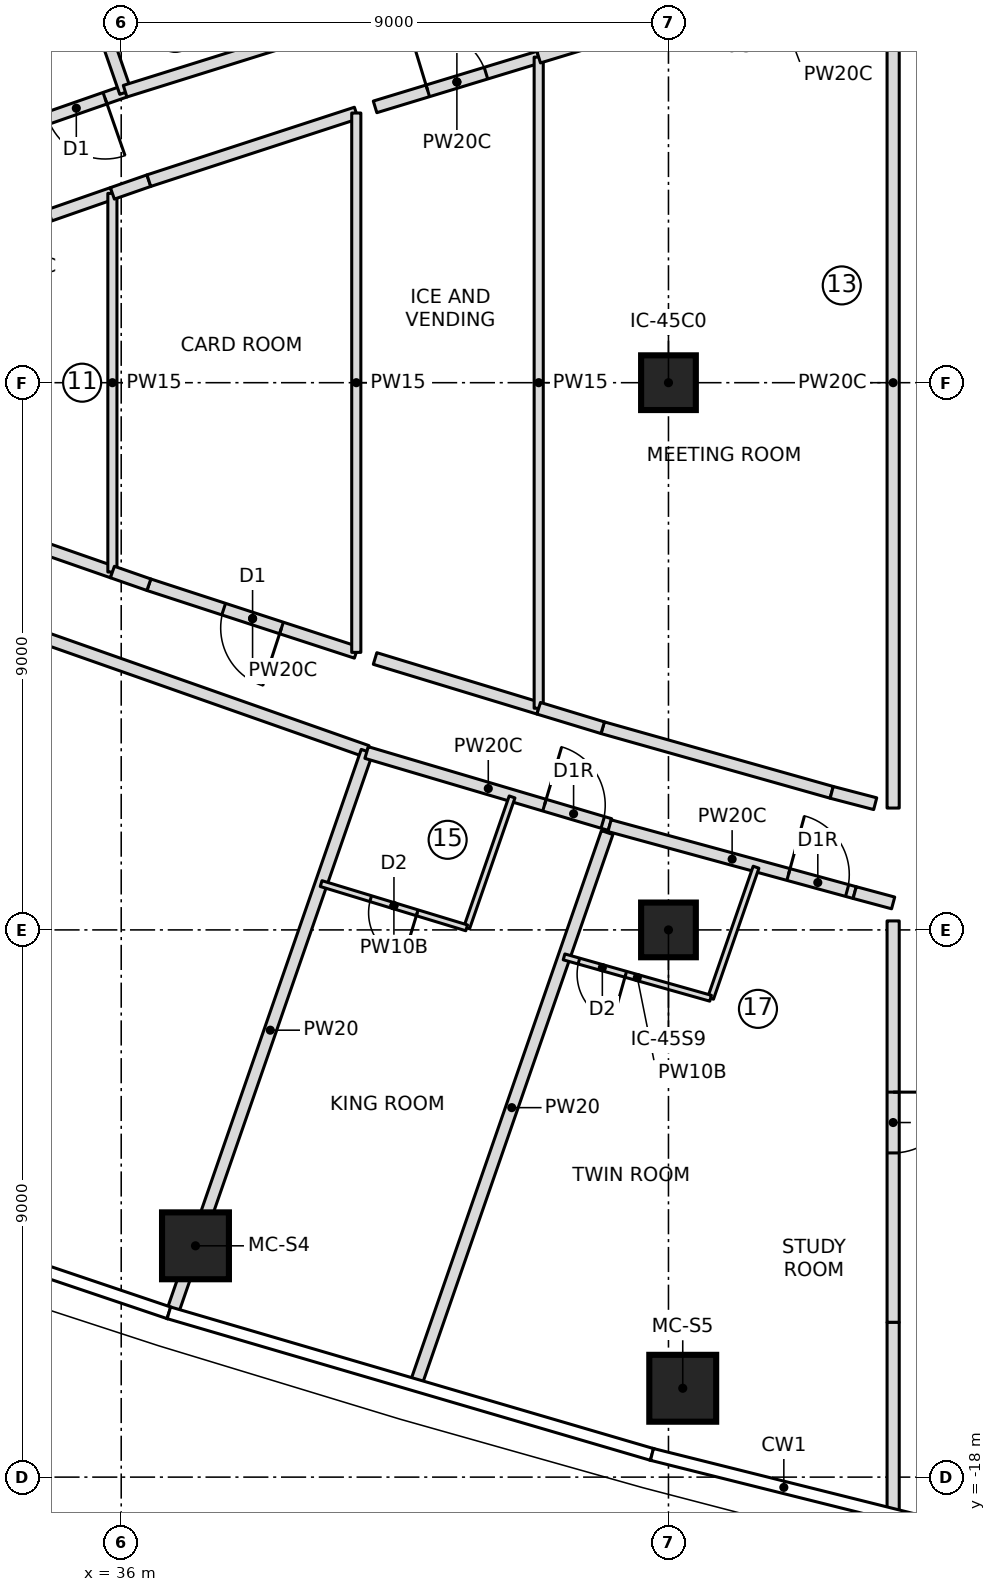
"""IFC4 building model, lengths in metres.
Left out: names, types, materials, properties, quantities, classifications, styles, units other than length and angle.
Written with IfcOpenShell. Run it as: python <this file> out.ifc"""

import sys

from ifc_helpers import new_model, si_unit, direction, frame, frame_2d, origin, origin_2d, place, context, subcontext, project, spatial, rectangle, extrude, element, fill, save


model = new_model("IFC4")
c1 = context("Model", 3, precision=1e-05, world=origin(), true_north=direction((0.0, 1.0)))
c2 = subcontext(c1, "Body", "Model", "MODEL_VIEW")
j1 = project(units=[si_unit("LENGTHUNIT", "METRE"), si_unit("PLANEANGLEUNIT", "RADIAN")], contexts=[c1])
p1 = place(None, origin())
s1 = spatial("IfcSite", under=j1, at=p1, CompositionType="ELEMENT")
p2 = place(p1, origin())
s2 = spatial("IfcBuilding", under=s1, at=p2, CompositionType="ELEMENT")
p3 = place(p2, frame((0.0, 0.0, 296.3)))
s3 = spatial("IfcBuildingStorey", under=s2, at=p3, CompositionType="ELEMENT", Elevation=296.3)
for number, where, z_axis, x_axis in (
    (1, (37.221, -14.196, 0.0), (0.0, 0.0, 1.0), (1.0, 0.0, 0.0)),
    (2, (45.235, -16.539, 0.0), (0.0, 0.0, 1.0), (1.0, 0.0, 0.0)),
):
    element("IfcColumn", number, at=place(p3, frame(where, z_axis=z_axis, x_axis=x_axis)), inside=s3, PredefinedType="COLUMN", context=c2, shape_type="SweptSolid", body=[
        extrude(rectangle(XDim=1.1, YDim=1.1, at=origin_2d()), origin(), (0.0, 0.0, 1.0), 3.55),
    ])
for number, where, z_axis, x_axis in (
    (3, (45.0, -9.0, 0.0), (0.0, 0.0, 1.0), (1.0, 0.0, 0.0)),
    (4, (45.0, 0.0, 0.0), (0.0, 0.0, 1.0), (1.0, 0.0, 0.0)),
):
    element("IfcColumn", number, at=place(p3, frame(where, z_axis=z_axis, x_axis=x_axis)), inside=s3, PredefinedType="COLUMN", context=c2, shape_type="SweptSolid", body=[
        extrude(rectangle(XDim=0.9, YDim=0.9, at=origin_2d()), origin(), (0.0, 0.0, 1.0), 3.55),
    ])
p4 = place(p3, frame((36.064, 4.794, 0.0), z_axis=(0.0, 0.0, 1.0), x_axis=(-0.944236129554, -0.329269086986, 0.0)))
e5 = element("IfcWall", 5, at=p4, inside=s3, PredefinedType="PARTITIONING", context=c2, shape_type="SweptSolid", body=[
    extrude(rectangle(XDim=4.174, YDim=0.2, at=frame_2d((2.087, 0.0))), origin(), (0.0, 0.0, 1.0), 3.25),
])
p5 = place(p4, frame((0.35, 0.0, 0.0)))
e6 = element("IfcOpeningElement", 6, at=p5, cuts=e5, PredefinedType="OPENING", context=c2, shape_type="SweptSolid", body=[
    extrude(rectangle(XDim=1.0, YDim=2.1, at=frame_2d((0.5, 1.05))), frame((0.0, 0.11, 0.0), z_axis=(0.0, -1.0, 0.0), x_axis=(1.0, 0.0, 0.0)), (0.0, 0.0, 1.0), 0.22),
])
p6 = place(p3, frame((36.071, 4.775, 0.0), z_axis=(0.0, 0.0, 1.0), x_axis=(-0.327725028322, 0.94477315045, 0.0)))
e7 = element("IfcWall", 7, at=p6, inside=s3, PredefinedType="PARTITIONING", context=c2, shape_type="SweptSolid", body=[
    extrude(rectangle(XDim=9.702, YDim=0.2, at=frame_2d((4.851, 0.0))), origin(), (0.0, 0.0, 1.0), 3.25),
])
p7 = place(p3, frame((44.031, 7.286, 0.0), z_axis=(0.0, 0.0, 1.0), x_axis=(-0.95441177989, -0.29849313963, 0.0)))
e8 = element("IfcWall", 8, at=p7, inside=s3, PredefinedType="PARTITIONING", context=c2, shape_type="SweptSolid", body=[
    extrude(rectangle(XDim=8.348, YDim=0.2, at=frame_2d((4.174, 0.0))), origin(), (0.0, 0.0, 1.0), 3.25),
])
p8 = place(p7, frame((0.35, 0.0, 0.0)))
e9 = element("IfcOpeningElement", 9, at=p8, cuts=e8, PredefinedType="OPENING", context=c2, shape_type="SweptSolid", body=[
    extrude(rectangle(XDim=1.5, YDim=2.1, at=frame_2d((0.75, 1.05))), frame((0.0, 0.11, 0.0), z_axis=(0.0, -1.0, 0.0), x_axis=(1.0, 0.0, 0.0)), (0.0, 0.0, 1.0), 0.22),
])
p9 = place(p3, frame((26.85, -1.423, 0.0), z_axis=(0.0, 0.0, 1.0), x_axis=(0.943328585164, -0.331860182022, 0.0)))
e10 = element("IfcWall", 10, at=p9, inside=s3, PredefinedType="PARTITIONING", context=c2, shape_type="SweptSolid", body=[
    extrude(rectangle(XDim=13.984, YDim=0.2, at=frame_2d((6.992, 0.0))), origin(), (0.0, 0.0, 1.0), 3.25),
])
p10 = place(p9, frame((3.05, 0.0, 0.0)))
e11 = element("IfcOpeningElement", 11, at=p10, cuts=e10, PredefinedType="OPENING", context=c2, shape_type="SweptSolid", body=[
    extrude(rectangle(XDim=1.5, YDim=2.1, at=frame_2d((0.75, 1.05))), frame((0.0, 0.11, 0.0), z_axis=(0.0, -1.0, 0.0), x_axis=(1.0, 0.0, 0.0)), (0.0, 0.0, 1.0), 0.22),
])
p11 = place(p3, frame((36.861, -15.235, 0.0), z_axis=(0.0, 0.0, 1.0), x_axis=(0.327710853631, 0.944778067279, 0.0)))
e12 = element("IfcWall", 12, at=p11, inside=s3, PredefinedType="PARTITIONING", context=c2, shape_type="SweptSolid", body=[
    extrude(rectangle(XDim=9.707, YDim=0.2, at=frame_2d((4.854, 0.0))), origin(), (0.0, 0.0, 1.0), 3.25),
])
p12 = place(p3, frame((40.035, -6.083, 0.0), z_axis=(0.0, 0.0, 1.0), x_axis=(0.958901312153, -0.283739799027, 0.0)))
e13 = element("IfcWall", 13, at=p12, inside=s3, PredefinedType="PARTITIONING", context=c2, shape_type="SweptSolid", body=[
    extrude(rectangle(XDim=4.174, YDim=0.2, at=frame_2d((2.087, 0.0))), origin(), (0.0, 0.0, 1.0), 3.25),
])
p13 = place(p12, frame((3.05, 0.0, 0.0)))
e14 = element("IfcOpeningElement", 14, at=p13, cuts=e13, PredefinedType="OPENING", context=c2, shape_type="SweptSolid", body=[
    extrude(rectangle(XDim=1.0, YDim=2.1, at=frame_2d((0.5, 1.05))), frame((0.0, 0.11, 0.0), z_axis=(0.0, -1.0, 0.0), x_axis=(1.0, 0.0, 0.0)), (0.0, 0.0, 1.0), 0.22),
])
p14 = place(p3, frame((42.428, -6.813, 0.0), z_axis=(0.0, 0.0, 1.0), x_axis=(-0.327743427431, -0.944766767925, 0.0)))
e15 = element("IfcWall", 15, at=p14, inside=s3, PredefinedType="PARTITIONING", context=c2, shape_type="SweptSolid", body=[
    extrude(rectangle(XDim=2.279, YDim=0.1, at=frame_2d((1.139, 0.0))), origin(), (0.0, 0.0, 1.0), 3.25),
])
p15 = place(p3, frame((41.681, -8.966, 0.0), z_axis=(0.0, 0.0, 1.0), x_axis=(-0.956723503196, 0.290998519638, 0.0)))
e16 = element("IfcWall", 16, at=p15, inside=s3, PredefinedType="PARTITIONING", context=c2, shape_type="SweptSolid", body=[
    extrude(rectangle(XDim=2.502, YDim=0.1, at=frame_2d((1.251, 0.0))), origin(), (0.0, 0.0, 1.0), 3.25),
])
p16 = place(p15, frame((0.85, 0.0, 0.0)))
e17 = element("IfcOpeningElement", 17, at=p16, cuts=e16, PredefinedType="OPENING", context=c2, shape_type="SweptSolid", body=[
    extrude(rectangle(XDim=0.8, YDim=2.1, at=frame_2d((0.4, 1.05))), frame((0.0, 0.06, 0.0), z_axis=(0.0, -1.0, 0.0), x_axis=(1.0, 0.0, 0.0)), (0.0, 0.0, 1.0), 0.12),
])
p17 = place(p3, frame((40.854, -16.447, 0.0), z_axis=(0.0, 0.0, 1.0), x_axis=(0.327714654767, 0.944776748788, 0.0)))
e18 = element("IfcWall", 18, at=p17, inside=s3, PredefinedType="PARTITIONING", context=c2, shape_type="SweptSolid", body=[
    extrude(rectangle(XDim=9.577, YDim=0.2, at=frame_2d((4.788, 0.0))), origin(), (0.0, 0.0, 1.0), 3.25),
])
p18 = place(p3, frame((44.031, -7.286, 0.0), z_axis=(0.0, 0.0, 1.0), x_axis=(0.964708521199, -0.263320088726, 0.0)))
e19 = element("IfcWall", 19, at=p18, inside=s3, PredefinedType="PARTITIONING", context=c2, shape_type="SweptSolid", body=[
    extrude(rectangle(XDim=4.179, YDim=0.2, at=frame_2d((2.089, 0.0))), origin(), (0.0, 0.0, 1.0), 3.25),
])
p19 = place(p18, frame((3.05, 0.0, 0.0)))
e20 = element("IfcOpeningElement", 20, at=p19, cuts=e19, PredefinedType="OPENING", context=c2, shape_type="SweptSolid", body=[
    extrude(rectangle(XDim=1.0, YDim=2.1, at=frame_2d((0.5, 1.05))), frame((0.0, 0.11, 0.0), z_axis=(0.0, -1.0, 0.0), x_axis=(1.0, 0.0, 0.0)), (0.0, 0.0, 1.0), 0.22),
])
p20 = place(p3, frame((46.44, -7.969, 0.0), z_axis=(0.0, 0.0, 1.0), x_axis=(-0.327764902685, -0.944759317799, 0.0)))
e21 = element("IfcWall", 21, at=p20, inside=s3, PredefinedType="PARTITIONING", context=c2, shape_type="SweptSolid", body=[
    extrude(rectangle(XDim=2.281, YDim=0.1, at=frame_2d((1.14, 0.0))), origin(), (0.0, 0.0, 1.0), 3.25),
])
p21 = place(p3, frame((45.693, -10.124, 0.0), z_axis=(0.0, 0.0, 1.0), x_axis=(-0.962409173596, 0.271603723424, 0.0)))
e22 = element("IfcWall", 22, at=p21, inside=s3, PredefinedType="PARTITIONING", context=c2, shape_type="SweptSolid", body=[
    extrude(rectangle(XDim=2.504, YDim=0.1, at=frame_2d((1.252, 0.0))), origin(), (0.0, 0.0, 1.0), 3.25),
])
p22 = place(p21, frame((1.45, 0.0, 0.0)))
e23 = element("IfcOpeningElement", 23, at=p22, cuts=e22, PredefinedType="OPENING", context=c2, shape_type="SweptSolid", body=[
    extrude(rectangle(XDim=0.8, YDim=2.1, at=frame_2d((0.4, 1.05))), frame((0.0, 0.06, 0.0), z_axis=(0.0, -1.0, 0.0), x_axis=(1.0, 0.0, 0.0)), (0.0, 0.0, 1.0), 0.12),
])
p23 = place(p3, frame((32.855, 2.068, 0.0), z_axis=(0.0, 0.0, 1.0), x_axis=(0.944260188635, 0.329200085296, 0.0)))
e24 = element("IfcWall", 24, at=p23, inside=s3, PredefinedType="PARTITIONING", context=c2, shape_type="SweptSolid", body=[
    extrude(rectangle(XDim=3.177, YDim=0.2, at=frame_2d((1.588, 0.0))), origin(), (0.0, 0.0, 1.0), 3.25),
])
p24 = place(p23, frame((1.088, 0.0, 0.0)))
e25 = element("IfcOpeningElement", 25, at=p24, cuts=e24, PredefinedType="OPENING", context=c2, shape_type="SweptSolid", body=[
    extrude(rectangle(XDim=1.0, YDim=2.1, at=frame_2d((0.5, 1.05))), frame((0.0, 0.11, 0.0), z_axis=(0.0, -1.0, 0.0), x_axis=(1.0, 0.0, 0.0)), (0.0, 0.0, 1.0), 0.22),
])
p25 = place(p3, frame((35.855, -3.114, 0.0), z_axis=(0.0, 0.0, 1.0), x_axis=(-0.944260188635, 0.329200085296, 0.0)))
e26 = element("IfcWall", 26, at=p25, inside=s3, PredefinedType="PARTITIONING", context=c2, shape_type="SweptSolid", body=[
    extrude(rectangle(XDim=3.177, YDim=0.2, at=frame_2d((1.588, 0.0))), origin(), (0.0, 0.0, 1.0), 3.25),
])
p26 = place(p3, frame((35.855, -3.114, 0.0), z_axis=(0.0, 0.0, 1.0), x_axis=(0.0, 1.0, 0.0)))
e27 = element("IfcWall", 27, at=p26, inside=s3, PredefinedType="PARTITIONING", context=c2, shape_type="SweptSolid", body=[
    extrude(rectangle(XDim=6.228, YDim=0.15, at=frame_2d((3.114, 0.0))), origin(), (0.0, 0.0, 1.0), 3.25),
])
p27 = place(p3, frame((39.866, -4.435, 0.0), z_axis=(0.0, 0.0, 1.0), x_axis=(-0.950718067733, 0.310056697535, 0.0)))
e28 = element("IfcWall", 28, at=p27, inside=s3, PredefinedType="PARTITIONING", context=c2, shape_type="SweptSolid", body=[
    extrude(rectangle(XDim=3.588, YDim=0.2, at=frame_2d((1.794, 0.0))), origin(), (0.0, 0.0, 1.0), 3.25),
])
p28 = place(p27, frame((1.294, 0.0, 0.0)))
e29 = element("IfcOpeningElement", 29, at=p28, cuts=e28, PredefinedType="OPENING", context=c2, shape_type="SweptSolid", body=[
    extrude(rectangle(XDim=1.0, YDim=2.1, at=frame_2d((0.5, 1.05))), frame((0.0, 0.11, 0.0), z_axis=(0.0, -1.0, 0.0), x_axis=(1.0, 0.0, 0.0)), (0.0, 0.0, 1.0), 0.22),
])
for number, where, z_axis, x_axis in (
    (30, (36.455, -3.323, 0.0), (0.0, 0.0, 1.0), (-0.944, 0.329, 0.0)),
    (31, (35.855, 3.114, 0.0), (0.0, 0.0, 1.0), (0.944, 0.329, 0.0)),
):
    element("IfcWall", number, at=place(p3, frame(where, z_axis=z_axis, x_axis=x_axis)), inside=s3, PredefinedType="PARTITIONING", context=c2, shape_type="SweptSolid", body=[
        extrude(rectangle(XDim=0.635, YDim=0.2, at=frame_2d((0.317, 0.0))), origin(), (0.0, 0.0, 1.0), 3.25),
    ])
p29 = place(p3, frame((36.455, 3.323, 0.0), z_axis=(0.0, 0.0, 1.0), x_axis=(0.950718067733, 0.310056697535, 0.0)))
e32 = element("IfcWall", 32, at=p29, inside=s3, PredefinedType="PARTITIONING", context=c2, shape_type="SweptSolid", body=[
    extrude(rectangle(XDim=3.588, YDim=0.2, at=frame_2d((1.794, 0.0))), origin(), (0.0, 0.0, 1.0), 3.25),
])
p30 = place(p3, frame((39.866, -4.435, 0.0), z_axis=(0.0, 0.0, 1.0), x_axis=(0.0, 1.0, 0.0)))
e33 = element("IfcWall", 33, at=p30, inside=s3, PredefinedType="PARTITIONING", context=c2, shape_type="SweptSolid", body=[
    extrude(rectangle(XDim=8.871, YDim=0.15, at=frame_2d((4.435, 0.0))), origin(), (0.0, 0.0, 1.0), 3.25),
])
p31 = place(p3, frame((40.175, 4.536, 0.0), z_axis=(0.0, 0.0, 1.0), x_axis=(0.956742178936, 0.290937111838, 0.0)))
e34 = element("IfcWall", 34, at=p31, inside=s3, PredefinedType="PARTITIONING", context=c2, shape_type="SweptSolid", body=[
    extrude(rectangle(XDim=2.813, YDim=0.2, at=frame_2d((1.406, 0.0))), origin(), (0.0, 0.0, 1.0), 3.25),
])
p32 = place(p31, frame((0.906, 0.0, 0.0)))
e35 = element("IfcOpeningElement", 35, at=p32, cuts=e34, PredefinedType="OPENING", context=c2, shape_type="SweptSolid", body=[
    extrude(rectangle(XDim=1.0, YDim=2.1, at=frame_2d((0.5, 1.05))), frame((0.0, 0.11, 0.0), z_axis=(0.0, -1.0, 0.0), x_axis=(1.0, 0.0, 0.0)), (0.0, 0.0, 1.0), 0.22),
])
p33 = place(p3, frame((42.866, -5.354, 0.0), z_axis=(0.0, 0.0, 1.0), x_axis=(-0.956742178936, 0.290937111838, 0.0)))
e36 = element("IfcWall", 36, at=p33, inside=s3, PredefinedType="PARTITIONING", context=c2, shape_type="SweptSolid", body=[
    extrude(rectangle(XDim=2.813, YDim=0.2, at=frame_2d((1.406, 0.0))), origin(), (0.0, 0.0, 1.0), 3.25),
])
p34 = place(p3, frame((42.866, -5.354, 0.0), z_axis=(0.0, 0.0, 1.0), x_axis=(0.0, 1.0, 0.0)))
e37 = element("IfcWall", 37, at=p34, inside=s3, PredefinedType="PARTITIONING", context=c2, shape_type="SweptSolid", body=[
    extrude(rectangle(XDim=10.709, YDim=0.15, at=frame_2d((5.354, 0.0))), origin(), (0.0, 0.0, 1.0), 3.25),
])
p35 = place(p3, frame((47.684, -6.738, 0.0), z_axis=(0.0, 0.0, 1.0), x_axis=(-0.962411212211, 0.271596499628, 0.0)))
e38 = element("IfcWall", 38, at=p35, inside=s3, PredefinedType="PARTITIONING", context=c2, shape_type="SweptSolid", body=[
    extrude(rectangle(XDim=3.913, YDim=0.2, at=frame_2d((1.957, 0.0))), origin(), (0.0, 0.0, 1.0), 3.25),
])
for number, where, z_axis, x_axis in (
    (39, (43.918, -5.675, 0.0), (0.0, 0.0, 1.0), (-0.957, 0.291, 0.0)),
    (40, (42.866, 5.354, 0.0), (0.0, 0.0, 1.0), (0.957, 0.291, 0.0)),
):
    element("IfcWall", number, at=place(p3, frame(where, z_axis=z_axis, x_axis=x_axis)), inside=s3, PredefinedType="PARTITIONING", context=c2, shape_type="SweptSolid", body=[
        extrude(rectangle(XDim=1.1, YDim=0.2, at=frame_2d((0.55, 0.0))), origin(), (0.0, 0.0, 1.0), 3.25),
    ])
p36 = place(p3, frame((48.4, -6.924, 0.0), z_axis=(0.0, 0.0, 1.0), x_axis=(-0.967585713416, 0.252542842294, 0.0)))
e41 = element("IfcWall", 41, at=p36, inside=s3, PredefinedType="PARTITIONING", context=c2, shape_type="SweptSolid", body=[
    extrude(rectangle(XDim=0.74, YDim=0.2, at=frame_2d((0.37, 0.0))), origin(), (0.0, 0.0, 1.0), 3.25),
])
p37 = place(p3, frame((48.695, -8.852, 0.0), z_axis=(0.0, 0.0, 1.0), x_axis=(0.0, -1.0, 0.0)))
e42 = element("IfcWall", 42, at=p37, inside=s3, PredefinedType="PARTITIONING", context=c2, shape_type="SweptSolid", body=[
    extrude(rectangle(XDim=6.603, YDim=0.2, at=frame_2d((3.302, 0.0))), origin(), (0.0, 0.0, 1.0), 3.25),
])
p38 = place(p37, frame((2.816, 0.0, 0.0)))
e43 = element("IfcOpeningElement", 43, at=p38, cuts=e42, PredefinedType="OPENING", context=c2, shape_type="SweptSolid", body=[
    extrude(rectangle(XDim=1.0, YDim=2.1, at=frame_2d((0.5, 1.05))), frame((0.0, 0.11, 0.0), z_axis=(0.0, -1.0, 0.0), x_axis=(1.0, 0.0, 0.0)), (0.0, 0.0, 1.0), 0.22),
])
p39 = place(p3, frame((48.695, 6.996, 0.0), z_axis=(0.0, 0.0, 1.0), x_axis=(0.0, -1.0, 0.0)))
e44 = element("IfcWall", 44, at=p39, inside=s3, PredefinedType="PARTITIONING", context=c2, shape_type="SweptSolid", body=[
    extrude(rectangle(XDim=13.992, YDim=0.2, at=frame_2d((6.996, 0.0))), origin(), (0.0, 0.0, 1.0), 3.25),
])
p40 = place(p3, frame((48.062, -8.386, 0.0), z_axis=(0.0, 0.0, 1.0), x_axis=(0.965669715173, -0.259772980114, 0.0)))
e45 = element("IfcWall", 45, at=p40, inside=s3, PredefinedType="PARTITIONING", context=c2, shape_type="SweptSolid", body=[
    extrude(rectangle(XDim=0.655, YDim=0.2, at=frame_2d((0.328, 0.0))), origin(), (0.0, 0.0, 1.0), 3.25),
])
p41 = place(p3, frame((48.695, -15.455, 0.0), z_axis=(0.0, 0.0, 1.0), x_axis=(0.0, -1.0, 0.0)))
e46 = element("IfcWall", 46, at=p41, inside=s3, PredefinedType="PARTITIONING", context=c2, shape_type="SweptSolid", body=[
    extrude(rectangle(XDim=3.098, YDim=0.2, at=frame_2d((1.549, 0.0))), origin(), (0.0, 0.0, 1.0), 3.25),
])
p42 = place(p5, origin())
e47 = element("IfcDoor", 47, at=p42, inside=s3, OperationType="SINGLE_SWING_LEFT", PredefinedType="DOOR", context=c2, shape_type="SweptSolid", body=[
    extrude(rectangle(XDim=1.0, YDim=2.1, at=frame_2d((0.5, 1.05))), frame((0.0, 0.025, 0.0), z_axis=(0.0, -1.0, 0.0), x_axis=(1.0, 0.0, 0.0)), (0.0, 0.0, 1.0), 0.05),
])
fill(e6, e47)
p43 = place(p16, origin())
e48 = element("IfcDoor", 48, at=p43, inside=s3, OperationType="SINGLE_SWING_LEFT", PredefinedType="DOOR", context=c2, shape_type="SweptSolid", body=[
    extrude(rectangle(XDim=0.8, YDim=2.1, at=frame_2d((0.4, 1.05))), frame((0.0, 0.025, 0.0), z_axis=(0.0, -1.0, 0.0), x_axis=(1.0, 0.0, 0.0)), (0.0, 0.0, 1.0), 0.05),
])
fill(e17, e48)
p44 = place(p13, origin())
e49 = element("IfcDoor", 49, at=p44, inside=s3, OperationType="SINGLE_SWING_RIGHT", PredefinedType="DOOR", context=c2, shape_type="SweptSolid", body=[
    extrude(rectangle(XDim=1.0, YDim=2.1, at=frame_2d((0.5, 1.05))), frame((0.0, 0.025, 0.0), z_axis=(0.0, -1.0, 0.0), x_axis=(1.0, 0.0, 0.0)), (0.0, 0.0, 1.0), 0.05),
])
fill(e14, e49)
p45 = place(p22, origin())
e50 = element("IfcDoor", 50, at=p45, inside=s3, OperationType="SINGLE_SWING_LEFT", PredefinedType="DOOR", context=c2, shape_type="SweptSolid", body=[
    extrude(rectangle(XDim=0.8, YDim=2.1, at=frame_2d((0.4, 1.05))), frame((0.0, 0.025, 0.0), z_axis=(0.0, -1.0, 0.0), x_axis=(1.0, 0.0, 0.0)), (0.0, 0.0, 1.0), 0.05),
])
fill(e23, e50)
p46 = place(p19, origin())
e51 = element("IfcDoor", 51, at=p46, inside=s3, OperationType="SINGLE_SWING_RIGHT", PredefinedType="DOOR", context=c2, shape_type="SweptSolid", body=[
    extrude(rectangle(XDim=1.0, YDim=2.1, at=frame_2d((0.5, 1.05))), frame((0.0, 0.025, 0.0), z_axis=(0.0, -1.0, 0.0), x_axis=(1.0, 0.0, 0.0)), (0.0, 0.0, 1.0), 0.05),
])
fill(e20, e51)
p47 = place(p28, origin())
e52 = element("IfcDoor", 52, at=p47, inside=s3, OperationType="SINGLE_SWING_LEFT", PredefinedType="DOOR", context=c2, shape_type="SweptSolid", body=[
    extrude(rectangle(XDim=1.0, YDim=2.1, at=frame_2d((0.5, 1.05))), frame((0.0, 0.025, 0.0), z_axis=(0.0, -1.0, 0.0), x_axis=(1.0, 0.0, 0.0)), (0.0, 0.0, 1.0), 0.05),
])
fill(e29, e52)
p48 = place(p32, origin())
e53 = element("IfcDoor", 53, at=p48, inside=s3, OperationType="SINGLE_SWING_RIGHT", PredefinedType="DOOR", context=c2, shape_type="SweptSolid", body=[
    extrude(rectangle(XDim=1.0, YDim=2.1, at=frame_2d((0.5, 1.05))), frame((0.0, 0.025, 0.0), z_axis=(0.0, -1.0, 0.0), x_axis=(1.0, 0.0, 0.0)), (0.0, 0.0, 1.0), 0.05),
])
fill(e35, e53)
p49 = place(p38, origin())
e54 = element("IfcDoor", 54, at=p49, inside=s3, OperationType="SINGLE_SWING_RIGHT", PredefinedType="DOOR", context=c2, shape_type="SweptSolid", body=[
    extrude(rectangle(XDim=1.0, YDim=2.1, at=frame_2d((0.5, 1.05))), frame((0.0, 0.025, 0.0), z_axis=(0.0, -1.0, 0.0), x_axis=(1.0, 0.0, 0.0)), (0.0, 0.0, 1.0), 0.05),
])
fill(e43, e54)
save(model, sys.argv[1])
